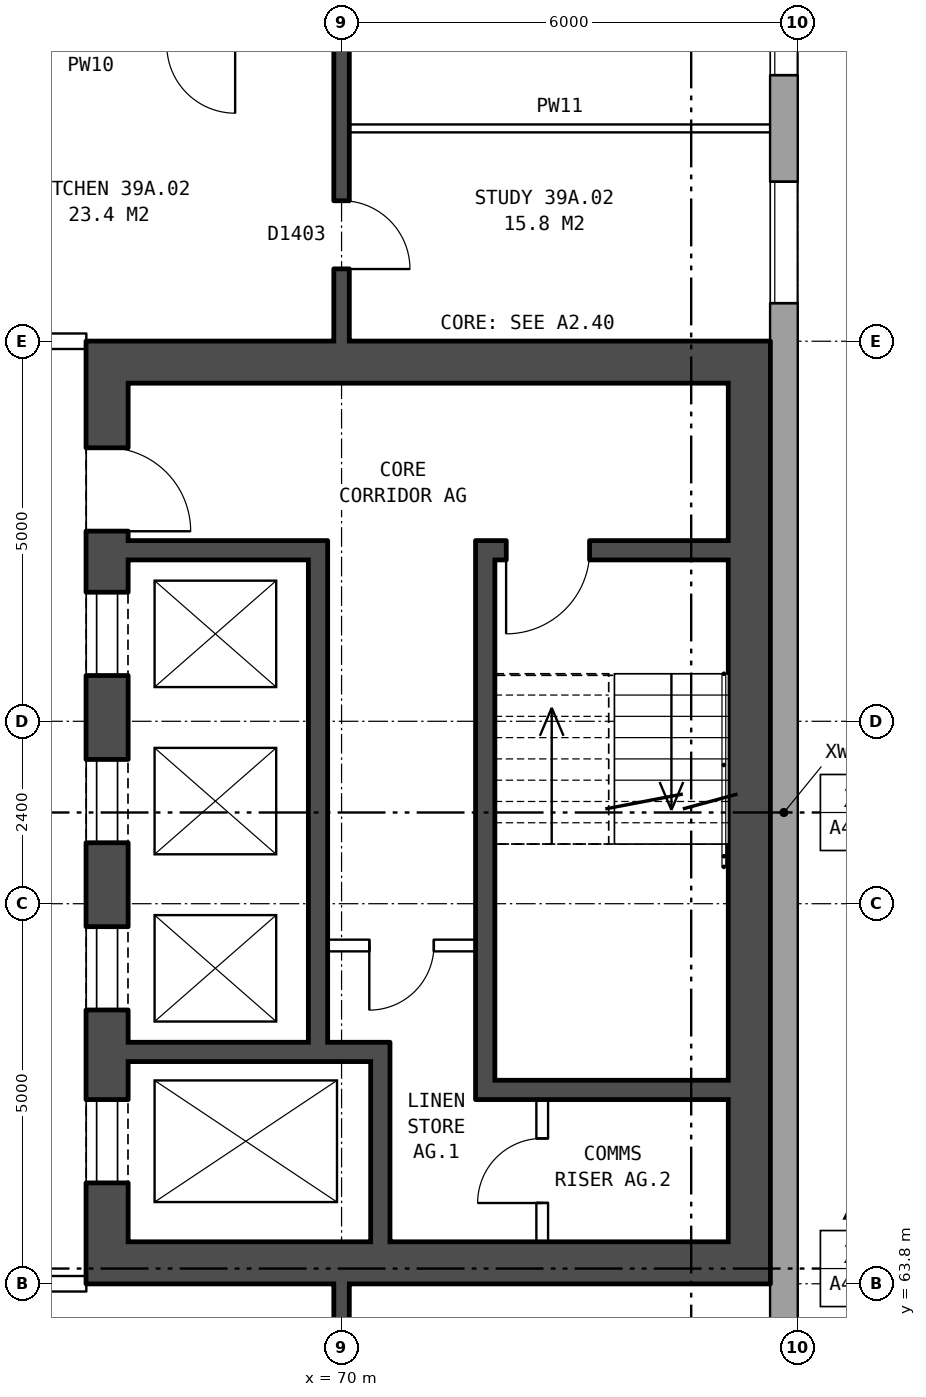
"""IFC4 building model, lengths in metres.
Left out: names, types, materials, properties, quantities, classifications, styles, units other than length and angle.
Written with IfcOpenShell. Run it as: python <this file> out.ifc"""

import sys

from ifc_helpers import new_model, si_unit, direction, frame, frame_2d, origin, place, context, subcontext, project, spatial, rectangle, extrude, element, fill, save


model = new_model("IFC4")
c1 = context("Model", 3, precision=1e-05, world=origin(), true_north=direction((0.0, 1.0)))
c2 = subcontext(c1, "Body", "Model", "MODEL_VIEW")
j1 = project(units=[si_unit("LENGTHUNIT", "METRE"), si_unit("PLANEANGLEUNIT", "RADIAN")], contexts=[c1])
p1 = place(None, origin())
s1 = spatial("IfcSite", under=j1, at=p1, CompositionType="ELEMENT")
p2 = place(p1, origin())
s2 = spatial("IfcBuilding", under=s1, at=p2, CompositionType="ELEMENT")
p3 = place(p2, frame((0.0, 0.0, 139.2)))
s3 = spatial("IfcBuildingStorey", under=s2, at=p3, CompositionType="ELEMENT", Elevation=139.2)
p4 = place(p3, frame((75.82, 57.075, 0.0), z_axis=(0.0, 0.0, 1.0), x_axis=(0.0, 1.0, 0.0)))
e1 = element("IfcWall", 1, at=p4, inside=s3, PredefinedType="STANDARD", context=c2, shape_type="SweptSolid", body=[
    extrude(rectangle(XDim=25.851, YDim=0.36, at=frame_2d((12.925, 0.0))), origin(), (0.0, 0.0, 1.0), 2.85),
])
p5 = place(p4, frame((1.625, 0.0, 0.8)))
e2 = element("IfcOpeningElement", 2, at=p5, cuts=e1, PredefinedType="OPENING", context=c2, shape_type="SweptSolid", body=[
    extrude(rectangle(XDim=1.6, YDim=1.8, at=frame_2d((0.8, 0.9))), frame((0.0, 0.19, 0.0), z_axis=(0.0, -1.0, 0.0), x_axis=(1.0, 0.0, 0.0)), (0.0, 0.0, 1.0), 0.38),
])
p6 = place(p4, frame((4.625, 0.0, 0.8)))
e3 = element("IfcOpeningElement", 3, at=p6, cuts=e1, PredefinedType="OPENING", context=c2, shape_type="SweptSolid", body=[
    extrude(rectangle(XDim=1.6, YDim=1.8, at=frame_2d((0.8, 0.9))), frame((0.0, 0.19, 0.0), z_axis=(0.0, -1.0, 0.0), x_axis=(1.0, 0.0, 0.0)), (0.0, 0.0, 1.0), 0.38),
])
p7 = place(p4, frame((19.625, 0.0, 0.8)))
e4 = element("IfcOpeningElement", 4, at=p7, cuts=e1, PredefinedType="OPENING", context=c2, shape_type="SweptSolid", body=[
    extrude(rectangle(XDim=1.6, YDim=1.8, at=frame_2d((0.8, 0.9))), frame((0.0, 0.19, 0.0), z_axis=(0.0, -1.0, 0.0), x_axis=(1.0, 0.0, 0.0)), (0.0, 0.0, 1.0), 0.38),
])
p8 = place(p4, frame((22.625, 0.0, 0.8)))
e5 = element("IfcOpeningElement", 5, at=p8, cuts=e1, PredefinedType="OPENING", context=c2, shape_type="SweptSolid", body=[
    extrude(rectangle(XDim=1.6, YDim=1.8, at=frame_2d((0.8, 0.9))), frame((0.0, 0.19, 0.0), z_axis=(0.0, -1.0, 0.0), x_axis=(1.0, 0.0, 0.0)), (0.0, 0.0, 1.0), 0.38),
])
p9 = place(p3, frame((66.915, 63.8, 0.0), z_axis=(0.0, 0.0, 1.0), x_axis=(0.0, 1.0, 0.0)))
e6 = element("IfcWall", 6, at=p9, inside=s3, PredefinedType="SHEAR", context=c2, shape_type="SweptSolid", body=[
    extrude(rectangle(XDim=12.4, YDim=0.55, at=frame_2d((6.2, 0.0))), origin(), (0.0, 0.0, 1.0), 2.85),
])
p10 = place(p9, frame((1.325, 0.0, 0.0)))
e7 = element("IfcOpeningElement", 7, at=p10, cuts=e6, PredefinedType="OPENING", context=c2, shape_type="SweptSolid", body=[
    extrude(rectangle(XDim=1.1, YDim=2.1, at=frame_2d((0.55, 1.05))), frame((0.0, 0.285, 0.0), z_axis=(0.0, -1.0, 0.0), x_axis=(1.0, 0.0, 0.0)), (0.0, 0.0, 1.0), 0.57),
])
p11 = place(p9, frame((3.6, 0.0, 0.0)))
e8 = element("IfcOpeningElement", 8, at=p11, cuts=e6, PredefinedType="OPENING", context=c2, shape_type="SweptSolid", body=[
    extrude(rectangle(XDim=1.1, YDim=2.1, at=frame_2d((0.55, 1.05))), frame((0.0, 0.285, 0.0), z_axis=(0.0, -1.0, 0.0), x_axis=(1.0, 0.0, 0.0)), (0.0, 0.0, 1.0), 0.57),
])
p12 = place(p9, frame((5.8, 0.0, 0.0)))
e9 = element("IfcOpeningElement", 9, at=p12, cuts=e6, PredefinedType="OPENING", context=c2, shape_type="SweptSolid", body=[
    extrude(rectangle(XDim=1.1, YDim=2.1, at=frame_2d((0.55, 1.05))), frame((0.0, 0.285, 0.0), z_axis=(0.0, -1.0, 0.0), x_axis=(1.0, 0.0, 0.0)), (0.0, 0.0, 1.0), 0.57),
])
p13 = place(p9, frame((8.0, 0.0, 0.0)))
e10 = element("IfcOpeningElement", 10, at=p13, cuts=e6, PredefinedType="OPENING", context=c2, shape_type="SweptSolid", body=[
    extrude(rectangle(XDim=1.1, YDim=2.1, at=frame_2d((0.55, 1.05))), frame((0.0, 0.285, 0.0), z_axis=(0.0, -1.0, 0.0), x_axis=(1.0, 0.0, 0.0)), (0.0, 0.0, 1.0), 0.57),
])
p14 = place(p9, frame((9.9, 0.0, 0.0)))
e11 = element("IfcOpeningElement", 11, at=p14, cuts=e6, PredefinedType="OPENING", context=c2, shape_type="SweptSolid", body=[
    extrude(rectangle(XDim=1.1, YDim=2.1, at=frame_2d((0.55, 1.05))), frame((0.0, 0.285, 0.0), z_axis=(0.0, -1.0, 0.0), x_axis=(1.0, 0.0, 0.0)), (0.0, 0.0, 1.0), 0.57),
])
p15 = place(p3, frame((75.365, 63.8, 0.0), z_axis=(0.0, 0.0, 1.0), x_axis=(0.0, 1.0, 0.0)))
e12 = element("IfcWall", 12, at=p15, inside=s3, PredefinedType="SHEAR", context=c2, shape_type="SweptSolid", body=[
    extrude(rectangle(XDim=12.4, YDim=0.55, at=frame_2d((6.2, 0.0))), origin(), (0.0, 0.0, 1.0), 2.85),
])
for number, where, z_axis, x_axis in (
    (13, (67.19, 64.075, 0.0), (0.0, 0.0, 1.0), (1.0, 0.0, 0.0)),
    (14, (67.19, 75.925, 0.0), (0.0, 0.0, 1.0), (1.0, 0.0, 0.0)),
):
    element("IfcWall", number, at=place(p3, frame(where, z_axis=z_axis, x_axis=x_axis)), inside=s3, PredefinedType="SHEAR", context=c2, shape_type="SweptSolid", body=[
        extrude(rectangle(XDim=7.9, YDim=0.55, at=frame_2d((3.95, 0.0))), origin(), (0.0, 0.0, 1.0), 2.85),
    ])
p16 = place(p3, frame((72.015, 66.35, 0.0), z_axis=(0.0, 0.0, 1.0), x_axis=(1.0, 0.0, 0.0)))
e15 = element("IfcWall", 15, at=p16, inside=s3, PredefinedType="SHEAR", context=c2, shape_type="SweptSolid", body=[
    extrude(rectangle(XDim=3.075, YDim=0.25, at=frame_2d((1.538, 0.0))), origin(), (0.0, 0.0, 1.0), 2.85),
])
p17 = place(p3, frame((67.19, 66.85, 0.0), z_axis=(0.0, 0.0, 1.0), x_axis=(1.0, 0.0, 0.0)))
e16 = element("IfcWall", 16, at=p17, inside=s3, PredefinedType="SHEAR", context=c2, shape_type="SweptSolid", body=[
    extrude(rectangle(XDim=3.445, YDim=0.25, at=frame_2d((1.723, 0.0))), origin(), (0.0, 0.0, 1.0), 2.85),
])
p18 = place(p3, frame((69.815, 68.25, 0.0), z_axis=(0.0, 0.0, 1.0), x_axis=(1.0, 0.0, 0.0)))
e17 = element("IfcWall", 17, at=p18, inside=s3, PredefinedType="PARTITIONING", context=c2, shape_type="SweptSolid", body=[
    extrude(rectangle(XDim=1.95, YDim=0.15, at=frame_2d((0.975, 0.0))), origin(), (0.0, 0.0, 1.0), 2.85),
])
p19 = place(p18, frame((0.55, 0.0, 0.0)))
e18 = element("IfcOpeningElement", 18, at=p19, cuts=e17, PredefinedType="OPENING", context=c2, shape_type="SweptSolid", body=[
    extrude(rectangle(XDim=0.85, YDim=2.1, at=frame_2d((0.425, 1.05))), frame((0.0, 0.085, 0.0), z_axis=(0.0, -1.0, 0.0), x_axis=(1.0, 0.0, 0.0)), (0.0, 0.0, 1.0), 0.17),
])
p20 = place(p3, frame((67.19, 73.45, 0.0), z_axis=(0.0, 0.0, 1.0), x_axis=(1.0, 0.0, 0.0)))
e19 = element("IfcWall", 19, at=p20, inside=s3, PredefinedType="SHEAR", context=c2, shape_type="SweptSolid", body=[
    extrude(rectangle(XDim=2.375, YDim=0.25, at=frame_2d((1.188, 0.0))), origin(), (0.0, 0.0, 1.0), 2.85),
])
p21 = place(p3, frame((72.015, 73.45, 0.0), z_axis=(0.0, 0.0, 1.0), x_axis=(1.0, 0.0, 0.0)))
e20 = element("IfcWall", 20, at=p21, inside=s3, PredefinedType="SHEAR", context=c2, shape_type="SweptSolid", body=[
    extrude(rectangle(XDim=3.075, YDim=0.25, at=frame_2d((1.538, 0.0))), origin(), (0.0, 0.0, 1.0), 2.85),
])
p22 = place(p21, frame((0.15, 0.0, 0.0)))
e21 = element("IfcOpeningElement", 21, at=p22, cuts=e20, PredefinedType="OPENING", context=c2, shape_type="SweptSolid", body=[
    extrude(rectangle(XDim=1.1, YDim=2.1, at=frame_2d((0.55, 1.05))), frame((0.0, 0.135, 0.0), z_axis=(0.0, -1.0, 0.0), x_axis=(1.0, 0.0, 0.0)), (0.0, 0.0, 1.0), 0.27),
])
p23 = place(p3, frame((69.69, 66.975, 0.0), z_axis=(0.0, 0.0, 1.0), x_axis=(0.0, 1.0, 0.0)))
e22 = element("IfcWall", 22, at=p23, inside=s3, PredefinedType="SHEAR", context=c2, shape_type="SweptSolid", body=[
    extrude(rectangle(XDim=6.6, YDim=0.25, at=frame_2d((3.3, 0.0))), origin(), (0.0, 0.0, 1.0), 2.85),
])
p24 = place(p3, frame((70.51, 64.35, 0.0), z_axis=(0.0, 0.0, 1.0), x_axis=(0.0, 1.0, 0.0)))
e23 = element("IfcWall", 23, at=p24, inside=s3, PredefinedType="SHEAR", context=c2, shape_type="SweptSolid", body=[
    extrude(rectangle(XDim=2.375, YDim=0.25, at=frame_2d((1.188, 0.0))), origin(), (0.0, 0.0, 1.0), 2.85),
])
p25 = place(p3, frame((71.89, 66.225, 0.0), z_axis=(0.0, 0.0, 1.0), x_axis=(0.0, 1.0, 0.0)))
e24 = element("IfcWall", 24, at=p25, inside=s3, PredefinedType="SHEAR", context=c2, shape_type="SweptSolid", body=[
    extrude(rectangle(XDim=7.35, YDim=0.25, at=frame_2d((3.675, 0.0))), origin(), (0.0, 0.0, 1.0), 2.85),
])
p26 = place(p3, frame((72.64, 64.35, 0.0), z_axis=(0.0, 0.0, 1.0), x_axis=(0.0, 1.0, 0.0)))
e25 = element("IfcWall", 25, at=p26, inside=s3, PredefinedType="PARTITIONING", context=c2, shape_type="SweptSolid", body=[
    extrude(rectangle(XDim=1.875, YDim=0.15, at=frame_2d((0.938, 0.0))), origin(), (0.0, 0.0, 1.0), 2.85),
])
p27 = place(p26, frame((0.512, 0.0, 0.0)))
e26 = element("IfcOpeningElement", 26, at=p27, cuts=e25, PredefinedType="OPENING", context=c2, shape_type="SweptSolid", body=[
    extrude(rectangle(XDim=0.85, YDim=2.1, at=frame_2d((0.425, 1.05))), frame((0.0, 0.085, 0.0), z_axis=(0.0, -1.0, 0.0), x_axis=(1.0, 0.0, 0.0)), (0.0, 0.0, 1.0), 0.17),
])
p28 = place(p3, frame((63.64, 63.8, 0.0), z_axis=(0.0, 0.0, 1.0), x_axis=(1.0, 0.0, 0.0)))
e27 = element("IfcWall", 27, at=p28, inside=s3, PredefinedType="PARTITIONING", context=c2, shape_type="SweptSolid", body=[
    extrude(rectangle(XDim=3.0, YDim=0.2, at=frame_2d((1.5, 0.0))), origin(), (0.0, 0.0, 1.0), 2.85),
])
p29 = place(p28, frame((1.18, 0.0, 0.0)))
e28 = element("IfcOpeningElement", 28, at=p29, cuts=e27, PredefinedType="OPENING", context=c2, shape_type="SweptSolid", body=[
    extrude(rectangle(XDim=1.0, YDim=2.1, at=frame_2d((0.5, 1.05))), frame((0.0, 0.11, 0.0), z_axis=(0.0, -1.0, 0.0), x_axis=(1.0, 0.0, 0.0)), (0.0, 0.0, 1.0), 0.22),
])
p30 = place(p3, frame((63.64, 76.2, 0.0), z_axis=(0.0, 0.0, 1.0), x_axis=(1.0, 0.0, 0.0)))
e29 = element("IfcWall", 29, at=p30, inside=s3, PredefinedType="PARTITIONING", context=c2, shape_type="SweptSolid", body=[
    extrude(rectangle(XDim=3.0, YDim=0.2, at=frame_2d((1.5, 0.0))), origin(), (0.0, 0.0, 1.0), 2.85),
])
p31 = place(p30, frame((1.18, 0.0, 0.0)))
e30 = element("IfcOpeningElement", 30, at=p31, cuts=e29, PredefinedType="OPENING", context=c2, shape_type="SweptSolid", body=[
    extrude(rectangle(XDim=1.0, YDim=2.1, at=frame_2d((0.5, 1.05))), frame((0.0, 0.11, 0.0), z_axis=(0.0, -1.0, 0.0), x_axis=(1.0, 0.0, 0.0)), (0.0, 0.0, 1.0), 0.22),
])
p32 = place(p3, frame((70.1, 79.0, 0.0), z_axis=(0.0, 0.0, 1.0), x_axis=(1.0, 0.0, 0.0)))
e31 = element("IfcWall", 31, at=p32, inside=s3, PredefinedType="PARTITIONING", context=c2, shape_type="SweptSolid", body=[
    extrude(rectangle(XDim=5.54, YDim=0.1, at=frame_2d((2.77, 0.0))), origin(), (0.0, 0.0, 1.0), 2.85),
])
p33 = place(p3, frame((70.0, 54.36, 0.0), z_axis=(0.0, 0.0, 1.0), x_axis=(0.0, 1.0, 0.0)))
e32 = element("IfcWall", 32, at=p33, inside=s3, PredefinedType="SOLIDWALL", context=c2, shape_type="SweptSolid", body=[
    extrude(rectangle(XDim=9.44, YDim=0.2, at=frame_2d((4.72, 0.0))), origin(), (0.0, 0.0, 1.0), 2.85),
])
p34 = place(p33, frame((7.04, 0.0, 0.0)))
e33 = element("IfcOpeningElement", 33, at=p34, cuts=e32, PredefinedType="OPENING", context=c2, shape_type="SweptSolid", body=[
    extrude(rectangle(XDim=0.9, YDim=2.1, at=frame_2d((0.45, 1.05))), frame((0.0, 0.11, 0.0), z_axis=(0.0, -1.0, 0.0), x_axis=(1.0, 0.0, 0.0)), (0.0, 0.0, 1.0), 0.22),
])
p35 = place(p3, frame((70.0, 76.2, 0.0), z_axis=(0.0, 0.0, 1.0), x_axis=(0.0, 1.0, 0.0)))
e34 = element("IfcWall", 34, at=p35, inside=s3, PredefinedType="SOLIDWALL", context=c2, shape_type="SweptSolid", body=[
    extrude(rectangle(XDim=9.44, YDim=0.2, at=frame_2d((4.72, 0.0))), origin(), (0.0, 0.0, 1.0), 2.85),
])
p36 = place(p35, frame((6.22, 0.0, 0.0)))
e35 = element("IfcOpeningElement", 35, at=p36, cuts=e34, PredefinedType="OPENING", context=c2, shape_type="SweptSolid", body=[
    extrude(rectangle(XDim=0.9, YDim=2.1, at=frame_2d((0.45, 1.05))), frame((0.0, 0.11, 0.0), z_axis=(0.0, -1.0, 0.0), x_axis=(1.0, 0.0, 0.0)), (0.0, 0.0, 1.0), 0.22),
])
p37 = place(p35, frame((0.95, 0.0, 0.0)))
e36 = element("IfcOpeningElement", 36, at=p37, cuts=e34, PredefinedType="OPENING", context=c2, shape_type="SweptSolid", body=[
    extrude(rectangle(XDim=0.9, YDim=2.1, at=frame_2d((0.45, 1.05))), frame((0.0, 0.11, 0.0), z_axis=(0.0, -1.0, 0.0), x_axis=(1.0, 0.0, 0.0)), (0.0, 0.0, 1.0), 0.22),
])
p38 = place(p7, origin())
e37 = element("IfcWindow", 37, at=p38, inside=s3, PartitioningType="SINGLE_PANEL", PredefinedType="WINDOW", context=c2, shape_type="SweptSolid", body=[
    extrude(rectangle(XDim=1.6, YDim=1.8, at=frame_2d((0.8, 0.9))), frame((0.0, 0.15, 0.0), z_axis=(0.0, -1.0, 0.0), x_axis=(1.0, 0.0, 0.0)), (0.0, 0.0, 1.0), 0.06),
])
fill(e4, e37)
p39 = place(p8, origin())
e38 = element("IfcWindow", 38, at=p39, inside=s3, PartitioningType="SINGLE_PANEL", PredefinedType="WINDOW", context=c2, shape_type="SweptSolid", body=[
    extrude(rectangle(XDim=1.6, YDim=1.8, at=frame_2d((0.8, 0.9))), frame((0.0, 0.15, 0.0), z_axis=(0.0, -1.0, 0.0), x_axis=(1.0, 0.0, 0.0)), (0.0, 0.0, 1.0), 0.06),
])
fill(e5, e38)
p40 = place(p10, origin())
e39 = element("IfcDoor", 39, at=p40, inside=s3, OperationType="DOUBLE_DOOR_SLIDING", PredefinedType="DOOR", context=c2, shape_type="SweptSolid", body=[
    extrude(rectangle(XDim=1.1, YDim=2.1, at=frame_2d((0.55, 1.05))), frame((0.0, -0.21, 0.0), z_axis=(0.0, -1.0, 0.0), x_axis=(1.0, 0.0, 0.0)), (0.0, 0.0, 1.0), 0.05),
])
fill(e7, e39)
p41 = place(p11, origin())
e40 = element("IfcDoor", 40, at=p41, inside=s3, OperationType="DOUBLE_DOOR_SLIDING", PredefinedType="DOOR", context=c2, shape_type="SweptSolid", body=[
    extrude(rectangle(XDim=1.1, YDim=2.1, at=frame_2d((0.55, 1.05))), frame((0.0, -0.21, 0.0), z_axis=(0.0, -1.0, 0.0), x_axis=(1.0, 0.0, 0.0)), (0.0, 0.0, 1.0), 0.05),
])
fill(e8, e40)
p42 = place(p12, origin())
e41 = element("IfcDoor", 41, at=p42, inside=s3, OperationType="DOUBLE_DOOR_SLIDING", PredefinedType="DOOR", context=c2, shape_type="SweptSolid", body=[
    extrude(rectangle(XDim=1.1, YDim=2.1, at=frame_2d((0.55, 1.05))), frame((0.0, -0.21, 0.0), z_axis=(0.0, -1.0, 0.0), x_axis=(1.0, 0.0, 0.0)), (0.0, 0.0, 1.0), 0.05),
])
fill(e9, e41)
p43 = place(p13, origin())
e42 = element("IfcDoor", 42, at=p43, inside=s3, OperationType="DOUBLE_DOOR_SLIDING", PredefinedType="DOOR", context=c2, shape_type="SweptSolid", body=[
    extrude(rectangle(XDim=1.1, YDim=2.1, at=frame_2d((0.55, 1.05))), frame((0.0, -0.21, 0.0), z_axis=(0.0, -1.0, 0.0), x_axis=(1.0, 0.0, 0.0)), (0.0, 0.0, 1.0), 0.05),
])
fill(e10, e42)
p44 = place(p14, frame((1.1, 0.0, 0.0), z_axis=(0.0, 0.0, 1.0), x_axis=(-1.0, 0.0, 0.0)))
e43 = element("IfcDoor", 43, at=p44, inside=s3, OperationType="SINGLE_SWING_RIGHT", PredefinedType="DOOR", context=c2, shape_type="SweptSolid", body=[
    extrude(rectangle(XDim=1.1, YDim=2.1, at=frame_2d((0.55, 1.05))), frame((0.0, 0.26, 0.0), z_axis=(0.0, -1.0, 0.0), x_axis=(1.0, 0.0, 0.0)), (0.0, 0.0, 1.0), 0.05),
])
fill(e11, e43)
p45 = place(p22, frame((1.1, 0.0, 0.0), z_axis=(0.0, 0.0, 1.0), x_axis=(-1.0, 0.0, 0.0)))
e44 = element("IfcDoor", 44, at=p45, inside=s3, OperationType="SINGLE_SWING_RIGHT", PredefinedType="DOOR", context=c2, shape_type="SweptSolid", body=[
    extrude(rectangle(XDim=1.1, YDim=2.1, at=frame_2d((0.55, 1.05))), frame((0.0, 0.025, 0.0), z_axis=(0.0, -1.0, 0.0), x_axis=(1.0, 0.0, 0.0)), (0.0, 0.0, 1.0), 0.05),
])
fill(e21, e44)
p46 = place(p19, frame((0.85, 0.0, 0.0), z_axis=(0.0, 0.0, 1.0), x_axis=(-1.0, 0.0, 0.0)))
e45 = element("IfcDoor", 45, at=p46, inside=s3, OperationType="SINGLE_SWING_RIGHT", PredefinedType="DOOR", context=c2, shape_type="SweptSolid", body=[
    extrude(rectangle(XDim=0.85, YDim=2.1, at=frame_2d((0.425, 1.05))), frame((0.0, 0.025, 0.0), z_axis=(0.0, -1.0, 0.0), x_axis=(1.0, 0.0, 0.0)), (0.0, 0.0, 1.0), 0.05),
])
fill(e18, e45)
p47 = place(p27, origin())
e46 = element("IfcDoor", 46, at=p47, inside=s3, OperationType="SINGLE_SWING_LEFT", PredefinedType="DOOR", context=c2, shape_type="SweptSolid", body=[
    extrude(rectangle(XDim=0.85, YDim=2.1, at=frame_2d((0.425, 1.05))), frame((0.0, 0.025, 0.0), z_axis=(0.0, -1.0, 0.0), x_axis=(1.0, 0.0, 0.0)), (0.0, 0.0, 1.0), 0.05),
])
fill(e26, e46)
p48 = place(p37, frame((0.9, 0.0, 0.0), z_axis=(0.0, 0.0, 1.0), x_axis=(-1.0, 0.0, 0.0)))
e47 = element("IfcDoor", 47, at=p48, inside=s3, OperationType="SINGLE_SWING_RIGHT", PredefinedType="DOOR", context=c2, shape_type="SweptSolid", body=[
    extrude(rectangle(XDim=0.9, YDim=2.1, at=frame_2d((0.45, 1.05))), frame((0.0, 0.025, 0.0), z_axis=(0.0, -1.0, 0.0), x_axis=(1.0, 0.0, 0.0)), (0.0, 0.0, 1.0), 0.05),
])
fill(e36, e47)
save(model, sys.argv[1])
